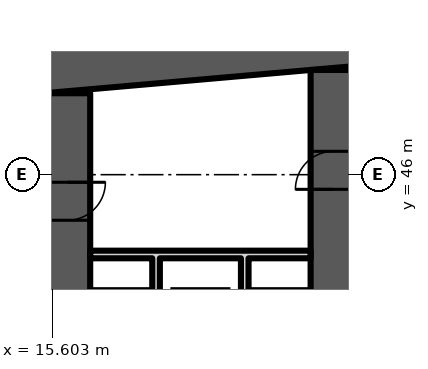
"""IFC4 building model, lengths in metres.
Left out: names, types, materials, properties, quantities, classifications, styles, units other than length and angle.
Written with IfcOpenShell. Run it as: python <this file> out.ifc"""

import sys

from ifc_helpers import new_model, si_unit, direction, frame, frame_2d, origin, place, context, subcontext, project, spatial, polyline, rectangle, outline, extrude, element, fill, save


model = new_model("IFC4")
c1 = context("Model", 3, precision=1e-05, world=origin(), true_north=direction((0.0, 1.0)))
c2 = subcontext(c1, "Body", "Model", "MODEL_VIEW")
j1 = project(units=[si_unit("LENGTHUNIT", "METRE"), si_unit("PLANEANGLEUNIT", "RADIAN")], contexts=[c1])
p1 = place(None, origin())
s1 = spatial("IfcSite", under=j1, at=p1, CompositionType="ELEMENT")
p2 = place(p1, origin())
s2 = spatial("IfcBuilding", under=s1, at=p2, CompositionType="ELEMENT")
p3 = place(p2, frame((0.0, 0.0, 66.7)))
s3 = spatial("IfcBuildingStorey", under=s2, at=p3, CompositionType="ELEMENT", Elevation=66.7)
p4 = place(p3, origin())
e1 = element("IfcWall", 1, at=p4, inside=s3, PredefinedType="SHEAR", context=c2, shape_type="SweptSolid", body=[
    extrude(outline(polyline([(9.0, 47.583), (37.0, 50.032), (65.0, 47.583), (65.0, 48.787), (37.0, 51.237), (9.0, 48.787), (9.0, 47.583)])), origin(), (0.0, 0.0, 1.0), 3.6),
])
p5 = place(p3, frame((16.0, 35.2, 0.0), z_axis=(0.0, 0.0, 1.0), x_axis=(0.0, 1.0, 0.0)))
e2 = element("IfcWall", 2, at=p5, inside=s3, PredefinedType="SHEAR", context=c2, shape_type="SweptSolid", body=[
    extrude(rectangle(XDim=12.943, YDim=1.2, at=frame_2d((6.471, 0.0))), origin(), (0.0, 0.0, 1.0), 3.6),
])
p6 = place(p5, frame((9.6, 0.0, 0.0)))
e3 = element("IfcOpeningElement", 3, at=p6, cuts=e2, PredefinedType="OPENING", context=c2, shape_type="SweptSolid", body=[
    extrude(rectangle(XDim=1.0, YDim=2.1, at=frame_2d((0.5, 1.05))), frame((0.0, 0.61, 0.0), z_axis=(0.0, -1.0, 0.0), x_axis=(1.0, 0.0, 0.0)), (0.0, 0.0, 1.0), 1.22),
])
p7 = place(p3, frame((23.0, 35.2, 0.0), z_axis=(0.0, 0.0, 1.0), x_axis=(0.0, 1.0, 0.0)))
e4 = element("IfcWall", 4, at=p7, inside=s3, PredefinedType="SHEAR", context=c2, shape_type="SweptSolid", body=[
    extrude(rectangle(XDim=13.555, YDim=1.2, at=frame_2d((6.778, 0.0))), origin(), (0.0, 0.0, 1.0), 3.6),
])
p8 = place(p7, frame((10.414, 0.0, 0.0)))
e5 = element("IfcOpeningElement", 5, at=p8, cuts=e4, PredefinedType="OPENING", context=c2, shape_type="SweptSolid", body=[
    extrude(rectangle(XDim=1.0, YDim=2.1, at=frame_2d((0.5, 1.05))), frame((0.0, 0.61, 0.0), z_axis=(0.0, -1.0, 0.0), x_axis=(1.0, 0.0, 0.0)), (0.0, 0.0, 1.0), 1.22),
])
p9 = place(p7, frame((3.2, 0.0, 0.0)))
e6 = element("IfcOpeningElement", 6, at=p9, cuts=e4, PredefinedType="OPENING", context=c2, shape_type="SweptSolid", body=[
    extrude(rectangle(XDim=1.1, YDim=2.1, at=frame_2d((0.55, 1.05))), frame((0.0, 0.61, 0.0), z_axis=(0.0, -1.0, 0.0), x_axis=(1.0, 0.0, 0.0)), (0.0, 0.0, 1.0), 1.22),
])
p10 = place(p3, frame((0.0, 0.0, -0.0)))
e7 = element("IfcWall", 7, at=p10, inside=s3, PredefinedType="PARTITIONING", context=c2, shape_type="SweptSolid", body=[
    extrude(outline(polyline([(18.433, 40.8), (18.233, 40.8), (18.233, 43.8), (16.6, 43.8), (16.6, 44.0), (22.4, 44.0), (22.4, 43.8), (20.767, 43.8), (20.767, 40.8), (20.567, 40.8), (20.567, 43.8), (18.433, 43.8), (18.433, 40.8)])), origin(), (0.0, 0.0, 1.0), 3.2),
])
p11 = place(p8, origin())
e8 = element("IfcDoor", 8, at=p11, inside=s3, OperationType="SINGLE_SWING_LEFT", PredefinedType="DOOR", context=c2, shape_type="SweptSolid", body=[
    extrude(rectangle(XDim=1.0, YDim=2.1, at=frame_2d((0.5, 1.05))), frame((0.0, 0.6, 0.0), z_axis=(0.0, -1.0, 0.0), x_axis=(1.0, 0.0, 0.0)), (0.0, 0.0, 1.0), 1.199),
])
fill(e5, e8)
p12 = place(p6, origin())
e9 = element("IfcDoor", 9, at=p12, inside=s3, OperationType="SINGLE_SWING_RIGHT", PredefinedType="DOOR", context=c2, shape_type="SweptSolid", body=[
    extrude(rectangle(XDim=1.0, YDim=2.1, at=frame_2d((0.5, 1.05))), frame((0.0, 0.6, 0.0), z_axis=(0.0, -1.0, 0.0), x_axis=(1.0, 0.0, 0.0)), (0.0, 0.0, 1.0), 1.199),
])
fill(e3, e9)
save(model, sys.argv[1])
